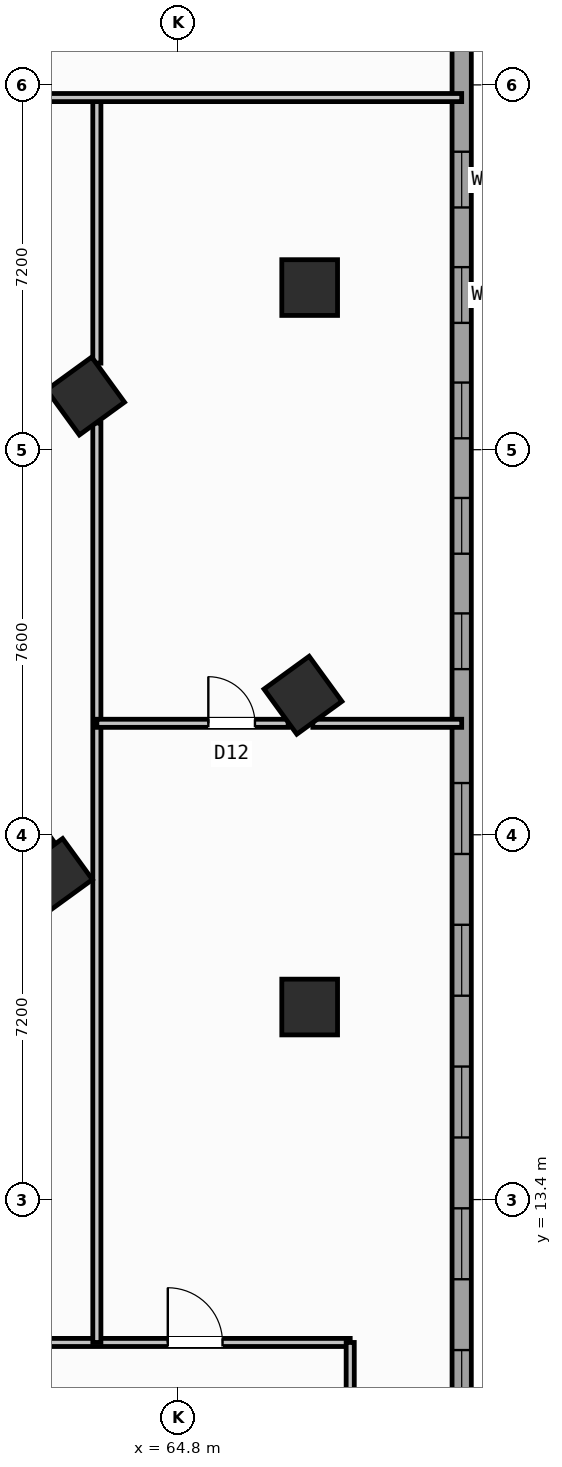
"""IFC4 building model, lengths in metres.
Left out: names, types, materials, properties, quantities, classifications, styles, units other than length and angle.
Written with IfcOpenShell. Run it as: python <this file> out.ifc"""

import sys

from ifc_helpers import new_model, si_unit, direction, frame, frame_2d, origin, origin_2d, place, context, subcontext, project, spatial, rectangle, hollow_rectangle, extrude, source, transform, mapped, element, fill, save


model = new_model("IFC4")
c1 = context("Model", 3, precision=1e-05, world=origin(), true_north=direction((0.0, 1.0)))
c2 = subcontext(c1, "Body", "Model", "MODEL_VIEW")
j1 = project(units=[si_unit("LENGTHUNIT", "METRE"), si_unit("PLANEANGLEUNIT", "RADIAN")], contexts=[c1])
p1 = place(None, origin())
s1 = spatial("IfcSite", under=j1, at=p1, CompositionType="ELEMENT")
p2 = place(p1, origin())
s2 = spatial("IfcBuilding", under=s1, at=p2, CompositionType="ELEMENT")
p3 = place(p2, frame((0.0, 0.0, 10.2)))
s3 = spatial("IfcBuildingStorey", under=s2, at=p3, CompositionType="ELEMENT", Elevation=10.2)
p4 = place(p3, frame((52.318, 13.11, 0.0), z_axis=(0.0, 0.0, 1.0), x_axis=(0.809019445368, 0.587781878776, 0.0)))
e1 = element("IfcWall", 1, at=p4, inside=s3, PredefinedType="SHEAR", context=c2, shape_type="SweptSolid", body=[
    extrude(rectangle(XDim=12.44, YDim=0.65, at=frame_2d((6.22, 0.0))), origin(), (0.0, 0.0, 1.0), 3.85),
])
m1 = source(origin(), c2, "Body", "SweptSolid", [
    extrude(hollow_rectangle(XDim=1.1, YDim=1.1, WallThickness=0.04, at=origin_2d()), origin(), (0.0, 0.0, 1.0), 4.2),
])
for number, where, z_axis, x_axis in (
    (2, (67.4, 17.2, 0.0), (0.0, 0.0, 1.0), (1.0, 0.0, 0.0)),
    (3, (67.4, 31.4, 0.0), (0.0, 0.0, 1.0), (1.0, 0.0, 0.0)),
    (4, (67.268, 23.354, 0.0), (0.0, 0.0, 1.0), (0.809, 0.588, 0.0)),
    (5, (62.977, 29.259, 0.0), (0.0, 0.0, 1.0), (0.809, 0.588, 0.0)),
):
    element("IfcColumn", number, at=place(p3, frame(where, z_axis=z_axis, x_axis=x_axis)), inside=s3, PredefinedType="COLUMN", context=c2, shape_type="MappedRepresentation", body=[
        mapped(m1, transform((0.0, 0.0, 0.0), scale=1.0)),
    ])
m2 = source(origin(), c2, "Body", "SweptSolid", [
    extrude(hollow_rectangle(XDim=1.0, YDim=1.0, WallThickness=0.04, at=origin_2d()), origin(), (0.0, 0.0, 1.0), 4.2),
])
p5 = place(p3, frame((62.414, 19.827, 0.0), z_axis=(0.0, 0.0, 1.0), x_axis=(0.809016994375, 0.587785252292, 0.0)))
e6 = element("IfcColumn", 6, at=p5, inside=s3, PredefinedType="COLUMN", context=c2, shape_type="MappedRepresentation", body=[
    mapped(m2, transform((0.0, 0.0, 0.0), scale=1.0)),
])
p6 = place(p3, frame((70.4, 43.117, 0.0), z_axis=(0.0, 0.0, 1.0), x_axis=(0.0, -1.0, 0.0)))
e7 = element("IfcWall", 7, at=p6, inside=s3, PredefinedType="STANDARD", context=c2, shape_type="SweptSolid", body=[
    extrude(rectangle(XDim=38.234, YDim=0.38, at=frame_2d((19.117, 0.0))), origin(), (0.0, 0.0, 1.0), 3.85),
])
p7 = place(p6, frame((1.259, 0.0, 0.85)))
e8 = element("IfcOpeningElement", 8, at=p7, cuts=e7, PredefinedType="OPENING", context=c2, shape_type="SweptSolid", body=[
    extrude(rectangle(XDim=2.2, YDim=1.75, at=frame_2d((1.1, 0.875))), frame((0.0, 0.2, 0.0), z_axis=(0.0, -1.0, 0.0), x_axis=(1.0, 0.0, 0.0)), (0.0, 0.0, 1.0), 0.4),
])
p8 = place(p6, frame((4.678, 0.0, 0.85)))
e9 = element("IfcOpeningElement", 9, at=p8, cuts=e7, PredefinedType="OPENING", context=c2, shape_type="SweptSolid", body=[
    extrude(rectangle(XDim=2.2, YDim=1.75, at=frame_2d((1.1, 0.875))), frame((0.0, 0.2, 0.0), z_axis=(0.0, -1.0, 0.0), x_axis=(1.0, 0.0, 0.0)), (0.0, 0.0, 1.0), 0.4),
])
p9 = place(p6, frame((9.036, 0.0, 1.0)))
e10 = element("IfcOpeningElement", 10, at=p9, cuts=e7, PredefinedType="OPENING", context=c2, shape_type="SweptSolid", body=[
    extrude(rectangle(XDim=1.1, YDim=1.35, at=frame_2d((0.55, 0.675))), frame((0.0, 0.2, 0.0), z_axis=(0.0, -1.0, 0.0), x_axis=(1.0, 0.0, 0.0)), (0.0, 0.0, 1.0), 0.4),
])
p10 = place(p6, frame((11.314, 0.0, 1.0)))
e11 = element("IfcOpeningElement", 11, at=p10, cuts=e7, PredefinedType="OPENING", context=c2, shape_type="SweptSolid", body=[
    extrude(rectangle(XDim=1.1, YDim=1.35, at=frame_2d((0.55, 0.675))), frame((0.0, 0.2, 0.0), z_axis=(0.0, -1.0, 0.0), x_axis=(1.0, 0.0, 0.0)), (0.0, 0.0, 1.0), 0.4),
])
p11 = place(p6, frame((13.592, 0.0, 1.0)))
e12 = element("IfcOpeningElement", 12, at=p11, cuts=e7, PredefinedType="OPENING", context=c2, shape_type="SweptSolid", body=[
    extrude(rectangle(XDim=1.1, YDim=1.35, at=frame_2d((0.55, 0.675))), frame((0.0, 0.2, 0.0), z_axis=(0.0, -1.0, 0.0), x_axis=(1.0, 0.0, 0.0)), (0.0, 0.0, 1.0), 0.4),
])
p12 = place(p6, frame((15.87, 0.0, 1.0)))
e13 = element("IfcOpeningElement", 13, at=p12, cuts=e7, PredefinedType="OPENING", context=c2, shape_type="SweptSolid", body=[
    extrude(rectangle(XDim=1.1, YDim=1.35, at=frame_2d((0.55, 0.675))), frame((0.0, 0.2, 0.0), z_axis=(0.0, -1.0, 0.0), x_axis=(1.0, 0.0, 0.0)), (0.0, 0.0, 1.0), 0.4),
])
p13 = place(p6, frame((18.148, 0.0, 1.0)))
e14 = element("IfcOpeningElement", 14, at=p13, cuts=e7, PredefinedType="OPENING", context=c2, shape_type="SweptSolid", body=[
    extrude(rectangle(XDim=1.1, YDim=1.35, at=frame_2d((0.55, 0.675))), frame((0.0, 0.2, 0.0), z_axis=(0.0, -1.0, 0.0), x_axis=(1.0, 0.0, 0.0)), (0.0, 0.0, 1.0), 0.4),
])
p14 = place(p6, frame((21.496, 0.0, 0.95)))
e15 = element("IfcOpeningElement", 15, at=p14, cuts=e7, PredefinedType="OPENING", context=c2, shape_type="SweptSolid", body=[
    extrude(rectangle(XDim=1.4, YDim=1.5, at=frame_2d((0.7, 0.75))), frame((0.0, 0.2, 0.0), z_axis=(0.0, -1.0, 0.0), x_axis=(1.0, 0.0, 0.0)), (0.0, 0.0, 1.0), 0.4),
])
p15 = place(p6, frame((24.294, 0.0, 0.95)))
e16 = element("IfcOpeningElement", 16, at=p15, cuts=e7, PredefinedType="OPENING", context=c2, shape_type="SweptSolid", body=[
    extrude(rectangle(XDim=1.4, YDim=1.5, at=frame_2d((0.7, 0.75))), frame((0.0, 0.2, 0.0), z_axis=(0.0, -1.0, 0.0), x_axis=(1.0, 0.0, 0.0)), (0.0, 0.0, 1.0), 0.4),
])
p16 = place(p6, frame((27.092, 0.0, 0.95)))
e17 = element("IfcOpeningElement", 17, at=p16, cuts=e7, PredefinedType="OPENING", context=c2, shape_type="SweptSolid", body=[
    extrude(rectangle(XDim=1.4, YDim=1.5, at=frame_2d((0.7, 0.75))), frame((0.0, 0.2, 0.0), z_axis=(0.0, -1.0, 0.0), x_axis=(1.0, 0.0, 0.0)), (0.0, 0.0, 1.0), 0.4),
])
p17 = place(p6, frame((29.89, 0.0, 0.95)))
e18 = element("IfcOpeningElement", 18, at=p17, cuts=e7, PredefinedType="OPENING", context=c2, shape_type="SweptSolid", body=[
    extrude(rectangle(XDim=1.4, YDim=1.5, at=frame_2d((0.7, 0.75))), frame((0.0, 0.2, 0.0), z_axis=(0.0, -1.0, 0.0), x_axis=(1.0, 0.0, 0.0)), (0.0, 0.0, 1.0), 0.4),
])
p18 = place(p6, frame((32.688, 0.0, 0.95)))
e19 = element("IfcOpeningElement", 19, at=p18, cuts=e7, PredefinedType="OPENING", context=c2, shape_type="SweptSolid", body=[
    extrude(rectangle(XDim=1.4, YDim=1.5, at=frame_2d((0.7, 0.75))), frame((0.0, 0.2, 0.0), z_axis=(0.0, -1.0, 0.0), x_axis=(1.0, 0.0, 0.0)), (0.0, 0.0, 1.0), 0.4),
])
p19 = place(p6, frame((35.485, 0.0, 0.95)))
e20 = element("IfcOpeningElement", 20, at=p19, cuts=e7, PredefinedType="OPENING", context=c2, shape_type="SweptSolid", body=[
    extrude(rectangle(XDim=1.4, YDim=1.5, at=frame_2d((0.7, 0.75))), frame((0.0, 0.2, 0.0), z_axis=(0.0, -1.0, 0.0), x_axis=(1.0, 0.0, 0.0)), (0.0, 0.0, 1.0), 0.4),
])
p20 = place(p3, frame((6.1, 10.58, 0.0), z_axis=(0.0, 0.0, 1.0), x_axis=(1.0, 0.0, 0.0)))
e21 = element("IfcWall", 21, at=p20, inside=s3, PredefinedType="PARTITIONING", context=c2, shape_type="SweptSolid", body=[
    extrude(rectangle(XDim=62.1, YDim=0.16, at=frame_2d((31.05, 0.0))), origin(), (0.0, 0.0, 1.0), 3.84),
])
p21 = place(p20, frame((29.0, 0.0, 0.0)))
e22 = element("IfcOpeningElement", 22, at=p21, cuts=e21, PredefinedType="OPENING", context=c2, shape_type="SweptSolid", body=[
    extrude(rectangle(XDim=1.7, YDim=2.2, at=frame_2d((0.85, 1.1))), frame((0.0, 0.09, 0.0), z_axis=(0.0, -1.0, 0.0), x_axis=(1.0, 0.0, 0.0)), (0.0, 0.0, 1.0), 0.18),
])
p22 = place(p20, frame((0.35, 0.0, 0.0)))
e23 = element("IfcOpeningElement", 23, at=p22, cuts=e21, PredefinedType="OPENING", context=c2, shape_type="SweptSolid", body=[
    extrude(rectangle(XDim=1.5, YDim=2.15, at=frame_2d((0.75, 1.075))), frame((0.0, 0.09, 0.0), z_axis=(0.0, -1.0, 0.0), x_axis=(1.0, 0.0, 0.0)), (0.0, 0.0, 1.0), 0.18),
])
p23 = place(p20, frame((5.2, 0.0, 0.0)))
e24 = element("IfcOpeningElement", 24, at=p23, cuts=e21, PredefinedType="OPENING", context=c2, shape_type="SweptSolid", body=[
    extrude(rectangle(XDim=1.08, YDim=2.15, at=frame_2d((0.54, 1.075))), frame((0.0, 0.09, 0.0), z_axis=(0.0, -1.0, 0.0), x_axis=(1.0, 0.0, 0.0)), (0.0, 0.0, 1.0), 0.18),
])
p24 = place(p20, frame((58.5, 0.0, 0.0)))
e25 = element("IfcOpeningElement", 25, at=p24, cuts=e21, PredefinedType="OPENING", context=c2, shape_type="SweptSolid", body=[
    extrude(rectangle(XDim=1.08, YDim=2.15, at=frame_2d((0.54, 1.075))), frame((0.0, 0.09, 0.0), z_axis=(0.0, -1.0, 0.0), x_axis=(1.0, 0.0, 0.0)), (0.0, 0.0, 1.0), 0.18),
])
p25 = place(p3, frame((63.2, 10.58, 0.0), z_axis=(0.0, 0.0, 1.0), x_axis=(0.0, 1.0, 0.0)))
e26 = element("IfcWall", 26, at=p25, inside=s3, PredefinedType="PARTITIONING", context=c2, shape_type="SweptSolid", body=[
    extrude(rectangle(XDim=18.147, YDim=0.16, at=frame_2d((9.073, 0.0))), origin(), (0.0, 0.0, 1.0), 3.84),
])
p26 = place(p3, frame((63.2, 29.908, 0.0), z_axis=(0.0, 0.0, 1.0), x_axis=(0.0, 1.0, 0.0)))
e27 = element("IfcWall", 27, at=p26, inside=s3, PredefinedType="PARTITIONING", context=c2, shape_type="SweptSolid", body=[
    extrude(rectangle(XDim=5.241, YDim=0.16, at=frame_2d((2.621, 0.0))), origin(), (0.0, 0.0, 1.0), 3.84),
])
p27 = place(p3, frame((59.392, 35.15, 0.0), z_axis=(0.0, 0.0, 1.0), x_axis=(1.0, 0.0, 0.0)))
e28 = element("IfcWall", 28, at=p27, inside=s3, PredefinedType="PARTITIONING", context=c2, shape_type="SweptSolid", body=[
    extrude(rectangle(XDim=11.008, YDim=0.16, at=frame_2d((5.504, 0.0))), origin(), (0.0, 0.0, 1.0), 3.84),
])
p28 = place(p3, frame((68.2, 7.62, 0.0), z_axis=(0.0, 0.0, 1.0), x_axis=(0.0, 1.0, 0.0)))
e29 = element("IfcWall", 29, at=p28, inside=s3, PredefinedType="PARTITIONING", context=c2, shape_type="SweptSolid", body=[
    extrude(rectangle(XDim=2.96, YDim=0.16, at=frame_2d((1.48, 0.0))), origin(), (0.0, 0.0, 1.0), 3.84),
])
p29 = place(p3, frame((63.2, 22.8, 0.0), z_axis=(0.0, 0.0, 1.0), x_axis=(1.0, 0.0, 0.0)))
e30 = element("IfcWall", 30, at=p29, inside=s3, PredefinedType="PARTITIONING", context=c2, shape_type="SweptSolid", body=[
    extrude(rectangle(XDim=3.775, YDim=0.16, at=frame_2d((1.888, 0.0))), origin(), (0.0, 0.0, 1.0), 3.84),
])
p30 = place(p29, frame((2.2, 0.0, 0.0)))
e31 = element("IfcOpeningElement", 31, at=p30, cuts=e30, PredefinedType="OPENING", context=c2, shape_type="SweptSolid", body=[
    extrude(rectangle(XDim=0.92, YDim=2.08, at=frame_2d((0.46, 1.04))), frame((0.0, 0.09, 0.0), z_axis=(0.0, -1.0, 0.0), x_axis=(1.0, 0.0, 0.0)), (0.0, 0.0, 1.0), 0.18),
])
p31 = place(p3, frame((67.462, 22.8, 0.0), z_axis=(0.0, 0.0, 1.0), x_axis=(1.0, 0.0, 0.0)))
e32 = element("IfcWall", 32, at=p31, inside=s3, PredefinedType="PARTITIONING", context=c2, shape_type="SweptSolid", body=[
    extrude(rectangle(XDim=2.938, YDim=0.16, at=frame_2d((1.469, 0.0))), origin(), (0.0, 0.0, 1.0), 3.84),
])
m3 = source(origin(), c2, "Body", "SweptSolid", [
    extrude(rectangle(XDim=1.1, YDim=1.35, at=frame_2d((0.55, 0.675))), frame((0.0, 0.03, 0.0), z_axis=(0.0, -1.0, 0.0), x_axis=(1.0, 0.0, 0.0)), (0.0, 0.0, 1.0), 0.06),
])
p32 = place(p9, origin())
e33 = element("IfcWindow", 33, at=p32, inside=s3, PartitioningType="SINGLE_PANEL", PredefinedType="WINDOW", context=c2, shape_type="MappedRepresentation", body=[
    mapped(m3, transform((0.0, 0.0, 0.0), scale=1.0)),
])
fill(e10, e33)
p33 = place(p10, origin())
e34 = element("IfcWindow", 34, at=p33, inside=s3, PartitioningType="SINGLE_PANEL", PredefinedType="WINDOW", context=c2, shape_type="MappedRepresentation", body=[
    mapped(m3, transform((0.0, 0.0, 0.0), scale=1.0)),
])
fill(e11, e34)
p34 = place(p11, origin())
e35 = element("IfcWindow", 35, at=p34, inside=s3, PartitioningType="SINGLE_PANEL", PredefinedType="WINDOW", context=c2, shape_type="MappedRepresentation", body=[
    mapped(m3, transform((0.0, 0.0, 0.0), scale=1.0)),
])
fill(e12, e35)
p35 = place(p12, origin())
e36 = element("IfcWindow", 36, at=p35, inside=s3, PartitioningType="SINGLE_PANEL", PredefinedType="WINDOW", context=c2, shape_type="MappedRepresentation", body=[
    mapped(m3, transform((0.0, 0.0, 0.0), scale=1.0)),
])
fill(e13, e36)
p36 = place(p13, origin())
e37 = element("IfcWindow", 37, at=p36, inside=s3, PartitioningType="SINGLE_PANEL", PredefinedType="WINDOW", context=c2, shape_type="MappedRepresentation", body=[
    mapped(m3, transform((0.0, 0.0, 0.0), scale=1.0)),
])
fill(e14, e37)
m4 = source(origin(), c2, "Body", "SweptSolid", [
    extrude(rectangle(XDim=1.4, YDim=1.5, at=frame_2d((0.7, 0.75))), frame((0.0, 0.03, 0.0), z_axis=(0.0, -1.0, 0.0), x_axis=(1.0, 0.0, 0.0)), (0.0, 0.0, 1.0), 0.06),
])
p37 = place(p14, origin())
e38 = element("IfcWindow", 38, at=p37, inside=s3, PartitioningType="SINGLE_PANEL", PredefinedType="WINDOW", context=c2, shape_type="MappedRepresentation", body=[
    mapped(m4, transform((0.0, 0.0, 0.0), scale=1.0)),
])
fill(e15, e38)
p38 = place(p15, origin())
e39 = element("IfcWindow", 39, at=p38, inside=s3, PartitioningType="SINGLE_PANEL", PredefinedType="WINDOW", context=c2, shape_type="MappedRepresentation", body=[
    mapped(m4, transform((0.0, 0.0, 0.0), scale=1.0)),
])
fill(e16, e39)
p39 = place(p16, origin())
e40 = element("IfcWindow", 40, at=p39, inside=s3, PartitioningType="SINGLE_PANEL", PredefinedType="WINDOW", context=c2, shape_type="MappedRepresentation", body=[
    mapped(m4, transform((0.0, 0.0, 0.0), scale=1.0)),
])
fill(e17, e40)
p40 = place(p17, origin())
e41 = element("IfcWindow", 41, at=p40, inside=s3, PartitioningType="SINGLE_PANEL", PredefinedType="WINDOW", context=c2, shape_type="MappedRepresentation", body=[
    mapped(m4, transform((0.0, 0.0, 0.0), scale=1.0)),
])
fill(e18, e41)
p41 = place(p18, origin())
e42 = element("IfcWindow", 42, at=p41, inside=s3, PartitioningType="SINGLE_PANEL", PredefinedType="WINDOW", context=c2, shape_type="MappedRepresentation", body=[
    mapped(m4, transform((0.0, 0.0, 0.0), scale=1.0)),
])
fill(e19, e42)
m5 = source(origin(), c2, "Body", "SweptSolid", [
    extrude(rectangle(XDim=1.08, YDim=2.15, at=frame_2d((0.54, 1.075))), frame((0.0, 0.025, 0.0), z_axis=(0.0, -1.0, 0.0), x_axis=(1.0, 0.0, 0.0)), (0.0, 0.0, 1.0), 0.05),
])
p42 = place(p24, origin())
e43 = element("IfcDoor", 43, at=p42, inside=s3, OperationType="SINGLE_SWING_LEFT", PredefinedType="DOOR", context=c2, shape_type="MappedRepresentation", body=[
    mapped(m5, transform((0.0, 0.0, 0.0), scale=1.0)),
])
fill(e25, e43)
m6 = source(origin(), c2, "Body", "SweptSolid", [
    extrude(rectangle(XDim=0.92, YDim=2.08, at=frame_2d((0.46, 1.04))), frame((0.0, 0.025, 0.0), z_axis=(0.0, -1.0, 0.0), x_axis=(1.0, 0.0, 0.0)), (0.0, 0.0, 1.0), 0.05),
])
p43 = place(p30, origin())
e44 = element("IfcDoor", 44, at=p43, inside=s3, OperationType="SINGLE_SWING_LEFT", PredefinedType="DOOR", context=c2, shape_type="MappedRepresentation", body=[
    mapped(m6, transform((0.0, 0.0, 0.0), scale=1.0)),
])
fill(e31, e44)
save(model, sys.argv[1])
